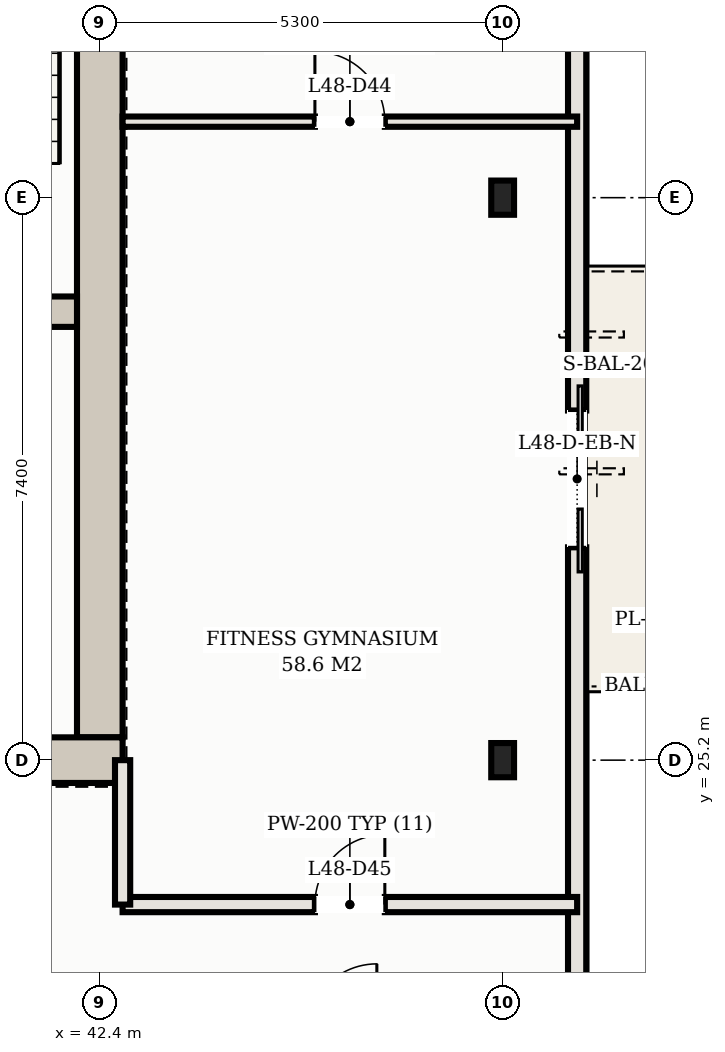
"""IFC4 building model, lengths in metres.
Left out: names, types, materials, properties, quantities, classifications, styles, units other than length and angle.
Written with IfcOpenShell. Run it as: python <this file> out.ifc"""

import sys

from ifc_helpers import new_model, si_unit, direction, frame, frame_2d, origin, origin_2d, place, context, subcontext, project, spatial, rectangle, hollow_rectangle, extrude, element, fill, save


model = new_model("IFC4")
c1 = context("Model", 3, precision=1e-05, world=origin(), true_north=direction((0.0, 1.0)))
c2 = subcontext(c1, "Body", "Model", "MODEL_VIEW")
j1 = project(units=[si_unit("LENGTHUNIT", "METRE"), si_unit("PLANEANGLEUNIT", "RADIAN")], contexts=[c1])
p1 = place(None, origin())
s1 = spatial("IfcSite", under=j1, at=p1, CompositionType="ELEMENT")
p2 = place(p1, origin())
s2 = spatial("IfcBuilding", under=s1, at=p2, CompositionType="ELEMENT")
p3 = place(p2, frame((0.0, 0.0, 175.5)))
s3 = spatial("IfcBuildingStorey", under=s2, at=p3, CompositionType="ELEMENT", Elevation=175.5)
p4 = place(p3, frame((42.4, 25.5, 0.0), z_axis=(0.0, 0.0, 1.0), x_axis=(0.0, 1.0, 0.0)))
e1 = element("IfcWall", 1, at=p4, inside=s3, PredefinedType="SHEAR", context=c2, shape_type="SweptSolid", body=[
    extrude(rectangle(XDim=14.2, YDim=0.6, at=frame_2d((7.1, 0.0))), origin(), (0.0, 0.0, 1.0), 3.1),
])
p5 = place(p3, frame((34.6, 25.2, 0.0), z_axis=(0.0, 0.0, 1.0), x_axis=(1.0, 0.0, 0.0)))
e2 = element("IfcWall", 2, at=p5, inside=s3, PredefinedType="SHEAR", context=c2, shape_type="SweptSolid", body=[
    extrude(rectangle(XDim=8.1, YDim=0.6, at=frame_2d((4.05, 0.0))), origin(), (0.0, 0.0, 1.0), 3.1),
])
p6 = place(p5, frame((0.65, 0.0, 0.0)))
e3 = element("IfcOpeningElement", 3, at=p6, cuts=e2, PredefinedType="OPENING", context=c2, shape_type="SweptSolid", body=[
    extrude(rectangle(XDim=1.25, YDim=2.2, at=frame_2d((0.625, 1.1))), frame((0.0, 0.31, 0.0), z_axis=(0.0, -1.0, 0.0), x_axis=(1.0, 0.0, 0.0)), (0.0, 0.0, 1.0), 0.62),
])
p7 = place(p3, frame((38.1, 31.1, 0.0), z_axis=(0.0, 0.0, 1.0), x_axis=(1.0, 0.0, 0.0)))
e4 = element("IfcWall", 4, at=p7, inside=s3, PredefinedType="SHEAR", context=c2, shape_type="SweptSolid", body=[
    extrude(rectangle(XDim=4.0, YDim=0.4, at=frame_2d((2.0, 0.0))), origin(), (0.0, 0.0, 1.0), 3.1),
])
for number, where, z_axis, x_axis in (
    (5, (47.7, 25.2, 0.0), (0.0, 0.0, 1.0), (1.0, 0.0, 0.0)),
    (6, (47.7, 32.6, 0.0), (0.0, 0.0, 1.0), (1.0, 0.0, 0.0)),
):
    element("IfcColumn", number, at=place(p3, frame(where, z_axis=z_axis, x_axis=x_axis)), inside=s3, PredefinedType="COLUMN", context=c2, shape_type="SweptSolid", body=[
        extrude(hollow_rectangle(XDim=0.3, YDim=0.45, WallThickness=0.016, at=origin_2d()), origin(), (0.0, 0.0, 1.0), 3.3),
    ])
p8 = place(p3, frame((48.68, 8.52, 0.0), z_axis=(0.0, 0.0, 1.0), x_axis=(0.0, 1.0, 0.0)))
e7 = element("IfcWall", 7, at=p8, inside=s3, PredefinedType="SOLIDWALL", context=c2, shape_type="SweptSolid", body=[
    extrude(rectangle(XDim=27.41, YDim=0.24, at=frame_2d((13.705, 0.0))), origin(), (0.0, 0.0, 1.0), 3.1),
])
p9 = place(p8, frame((19.48, 0.0, 0.0)))
e8 = element("IfcOpeningElement", 8, at=p9, cuts=e7, PredefinedType="OPENING", context=c2, shape_type="SweptSolid", body=[
    extrude(rectangle(XDim=1.8, YDim=2.2, at=frame_2d((0.9, 1.1))), frame((0.0, 0.13, 0.0), z_axis=(0.0, -1.0, 0.0), x_axis=(1.0, 0.0, 0.0)), (0.0, 0.0, 1.0), 0.26),
])
p10 = place(p3, frame((42.7, 23.3, 0.0), z_axis=(0.0, 0.0, 1.0), x_axis=(1.0, 0.0, 0.0)))
e9 = element("IfcWall", 9, at=p10, inside=s3, PredefinedType="PARTITIONING", context=c2, shape_type="SweptSolid", body=[
    extrude(rectangle(XDim=5.98, YDim=0.2, at=frame_2d((2.99, 0.0))), origin(), (0.0, 0.0, 1.0), 2.38),
])
p11 = place(p10, frame((2.53, 0.0, 0.0)))
e10 = element("IfcOpeningElement", 10, at=p11, cuts=e9, PredefinedType="OPENING", context=c2, shape_type="SweptSolid", body=[
    extrude(rectangle(XDim=0.92, YDim=2.15, at=frame_2d((0.46, 1.075))), frame((0.0, 0.11, 0.0), z_axis=(0.0, -1.0, 0.0), x_axis=(1.0, 0.0, 0.0)), (0.0, 0.0, 1.0), 0.22),
])
p12 = place(p3, frame((42.7, 23.3, 0.0), z_axis=(0.0, 0.0, 1.0), x_axis=(0.0, 1.0, 0.0)))
e11 = element("IfcWall", 11, at=p12, inside=s3, PredefinedType="PARTITIONING", context=c2, shape_type="SweptSolid", body=[
    extrude(rectangle(XDim=1.9, YDim=0.2, at=frame_2d((0.95, 0.0))), origin(), (0.0, 0.0, 1.0), 2.38),
])
p13 = place(p3, frame((42.7, 33.6, 0.0), z_axis=(0.0, 0.0, 1.0), x_axis=(1.0, 0.0, 0.0)))
e12 = element("IfcWall", 12, at=p13, inside=s3, PredefinedType="PARTITIONING", context=c2, shape_type="SweptSolid", body=[
    extrude(rectangle(XDim=5.98, YDim=0.135, at=frame_2d((2.99, 0.0))), origin(), (0.0, 0.0, 1.0), 2.38),
])
p14 = place(p13, frame((2.53, 0.0, 0.0)))
e13 = element("IfcOpeningElement", 13, at=p14, cuts=e12, PredefinedType="OPENING", context=c2, shape_type="SweptSolid", body=[
    extrude(rectangle(XDim=0.92, YDim=2.15, at=frame_2d((0.46, 1.075))), frame((0.0, 0.078, 0.0), z_axis=(0.0, -1.0, 0.0), x_axis=(1.0, 0.0, 0.0)), (0.0, 0.0, 1.0), 0.155),
])
p15 = place(p9, frame((1.8, 0.0, 0.0), z_axis=(0.0, 0.0, 1.0), x_axis=(-1.0, 0.0, 0.0)))
e14 = element("IfcDoor", 14, at=p15, inside=s3, OperationType="DOUBLE_DOOR_SLIDING", PredefinedType="DOOR", context=c2, shape_type="SweptSolid", body=[
    extrude(rectangle(XDim=1.8, YDim=2.2, at=frame_2d((0.9, 1.1))), frame((0.0, 0.025, 0.0), z_axis=(0.0, -1.0, 0.0), x_axis=(1.0, 0.0, 0.0)), (0.0, 0.0, 1.0), 0.05),
])
fill(e8, e14)
p16 = place(p14, origin())
e15 = element("IfcDoor", 15, at=p16, inside=s3, OperationType="SINGLE_SWING_LEFT", PredefinedType="DOOR", context=c2, shape_type="SweptSolid", body=[
    extrude(rectangle(XDim=0.92, YDim=2.15, at=frame_2d((0.46, 1.075))), frame((0.0, 0.025, 0.0), z_axis=(0.0, -1.0, 0.0), x_axis=(1.0, 0.0, 0.0)), (0.0, 0.0, 1.0), 0.05),
])
fill(e13, e15)
p17 = place(p11, origin())
e16 = element("IfcDoor", 16, at=p17, inside=s3, OperationType="SINGLE_SWING_RIGHT", PredefinedType="DOOR", context=c2, shape_type="SweptSolid", body=[
    extrude(rectangle(XDim=0.92, YDim=2.15, at=frame_2d((0.46, 1.075))), frame((0.0, 0.025, 0.0), z_axis=(0.0, -1.0, 0.0), x_axis=(1.0, 0.0, 0.0)), (0.0, 0.0, 1.0), 0.05),
])
fill(e10, e16)
save(model, sys.argv[1])
